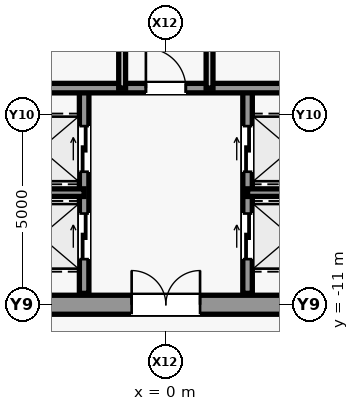
"""IFC4 building model, lengths in metres.
Left out: names, types, materials, properties, quantities, classifications, styles, units other than length and angle.
Written with IfcOpenShell. Run it as: python <this file> out.ifc"""

import sys

from ifc_helpers import new_model, si_unit, direction, frame, frame_2d, origin, place, context, subcontext, project, spatial, rectangle, extrude, source, transform, mapped, element, fill, save


model = new_model("IFC4")
c1 = context("Model", 3, precision=1e-05, world=origin(), true_north=direction((0.0, 1.0)))
c2 = subcontext(c1, "Body", "Model", "MODEL_VIEW")
j1 = project(units=[si_unit("LENGTHUNIT", "METRE"), si_unit("PLANEANGLEUNIT", "RADIAN")], contexts=[c1])
p1 = place(None, origin())
s1 = spatial("IfcSite", under=j1, at=p1, CompositionType="ELEMENT")
p2 = place(p1, origin())
s2 = spatial("IfcBuilding", under=s1, at=p2, CompositionType="ELEMENT")
p3 = place(p2, frame((0.0, 0.0, 12.0)))
s3 = spatial("IfcBuildingStorey", under=s2, at=p3, CompositionType="ELEMENT", Elevation=12.0)
m1 = source(origin(), c2, "Body", "SweptSolid", [
    extrude(rectangle(XDim=9.2, YDim=0.5, at=frame_2d((4.6, 0.0))), origin(), (0.0, 0.0, 1.0), 5.08),
])
p4 = place(p3, frame((-4.6, -11.0, 0.0), z_axis=(0.0, 0.0, 1.0), x_axis=(1.0, 0.0, 0.0)))
e1 = element("IfcWall", 1, at=p4, inside=s3, PredefinedType="SHEAR", context=c2, shape_type="MappedRepresentation", body=[
    mapped(m1, transform((0.0, 0.0, 0.0), scale=1.0)),
])
m2 = source(origin(), c2, "Body", "SweptSolid", [
    extrude(rectangle(XDim=1.8, YDim=2.25, at=frame_2d((0.9, 1.125))), frame((0.0, 0.26, 0.0), z_axis=(0.0, -1.0, 0.0), x_axis=(1.0, 0.0, 0.0)), (0.0, 0.0, 1.0), 0.52),
])
p5 = place(p4, frame((3.7, 0.0, 0.0)))
e2 = element("IfcOpeningElement", 2, at=p5, cuts=e1, PredefinedType="OPENING", context=c2, shape_type="MappedRepresentation", body=[
    mapped(m2, transform((0.0, 0.0, 0.0), scale=1.0)),
])
m3 = source(origin(), c2, "Body", "SweptSolid", [
    extrude(rectangle(XDim=5.4, YDim=0.25, at=frame_2d((2.7, 0.0))), origin(), (0.0, 0.0, 1.0), 5.08),
])
p6 = place(p3, frame((-2.15, -10.7, 0.0), z_axis=(0.0, 0.0, 1.0), x_axis=(0.0, 1.0, 0.0)))
e3 = element("IfcWall", 3, at=p6, inside=s3, PredefinedType="SHEAR", context=c2, shape_type="MappedRepresentation", body=[
    mapped(m3, transform((0.0, 0.0, 0.0), scale=1.0)),
])
m4 = source(origin(), c2, "Body", "SweptSolid", [
    extrude(rectangle(XDim=1.2, YDim=2.3, at=frame_2d((0.6, 1.15))), frame((0.0, 0.135, 0.0), z_axis=(0.0, -1.0, 0.0), x_axis=(1.0, 0.0, 0.0)), (0.0, 0.0, 1.0), 0.27),
])
p7 = place(p6, frame((0.9, 0.0, 0.0)))
e4 = element("IfcOpeningElement", 4, at=p7, cuts=e3, PredefinedType="OPENING", context=c2, shape_type="MappedRepresentation", body=[
    mapped(m4, transform((0.0, 0.0, 0.0), scale=1.0)),
])
p8 = place(p6, frame((3.2, 0.0, 0.0)))
e5 = element("IfcOpeningElement", 5, at=p8, cuts=e3, PredefinedType="OPENING", context=c2, shape_type="MappedRepresentation", body=[
    mapped(m4, transform((0.0, 0.0, 0.0), scale=1.0)),
])
p9 = place(p3, frame((2.15, -10.7, 0.0), z_axis=(0.0, 0.0, 1.0), x_axis=(0.0, 1.0, 0.0)))
e6 = element("IfcWall", 6, at=p9, inside=s3, PredefinedType="SHEAR", context=c2, shape_type="MappedRepresentation", body=[
    mapped(m3, transform((0.0, 0.0, 0.0), scale=1.0)),
])
p10 = place(p9, frame((0.9, 0.0, 0.0)))
e7 = element("IfcOpeningElement", 7, at=p10, cuts=e6, PredefinedType="OPENING", context=c2, shape_type="MappedRepresentation", body=[
    mapped(m4, transform((0.0, 0.0, 0.0), scale=1.0)),
])
p11 = place(p9, frame((3.2, 0.0, 0.0)))
e8 = element("IfcOpeningElement", 8, at=p11, cuts=e6, PredefinedType="OPENING", context=c2, shape_type="MappedRepresentation", body=[
    mapped(m4, transform((0.0, 0.0, 0.0), scale=1.0)),
])
m5 = source(origin(), c2, "Body", "SweptSolid", [
    extrude(rectangle(XDim=2.45, YDim=0.2, at=frame_2d((1.225, 0.0))), origin(), (0.0, 0.0, 1.0), 5.08),
])
for number, where, z_axis, x_axis in (
    (9, (-4.6, -8.05, 0.0), (0.0, 0.0, 1.0), (1.0, 0.0, 0.0)),
    (10, (2.15, -8.05, 0.0), (0.0, 0.0, 1.0), (1.0, 0.0, 0.0)),
):
    element("IfcWall", number, at=place(p3, frame(where, z_axis=z_axis, x_axis=x_axis)), inside=s3, PredefinedType="SHEAR", context=c2, shape_type="MappedRepresentation", body=[
        mapped(m5, transform((0.0, 0.0, 0.0), scale=1.0)),
    ])
m6 = source(origin(), c2, "Body", "SweptSolid", [
    extrude(rectangle(XDim=9.2, YDim=0.25, at=frame_2d((4.6, 0.0))), origin(), (0.0, 0.0, 1.0), 5.08),
])
p12 = place(p3, frame((-4.6, -5.3, 0.0), z_axis=(0.0, 0.0, 1.0), x_axis=(1.0, 0.0, 0.0)))
e11 = element("IfcWall", 11, at=p12, inside=s3, PredefinedType="SHEAR", context=c2, shape_type="MappedRepresentation", body=[
    mapped(m6, transform((0.0, 0.0, 0.0), scale=1.0)),
])
m7 = source(origin(), c2, "Body", "SweptSolid", [
    extrude(rectangle(XDim=1.05, YDim=2.2, at=frame_2d((0.525, 1.1))), frame((0.0, 0.135, 0.0), z_axis=(0.0, -1.0, 0.0), x_axis=(1.0, 0.0, 0.0)), (0.0, 0.0, 1.0), 0.27),
])
p13 = place(p12, frame((4.075, 0.0, 0.0)))
e12 = element("IfcOpeningElement", 12, at=p13, cuts=e11, PredefinedType="OPENING", context=c2, shape_type="MappedRepresentation", body=[
    mapped(m7, transform((0.0, 0.0, 0.0), scale=1.0)),
])
m8 = source(origin(), c2, "Body", "SweptSolid", [
    extrude(rectangle(XDim=10.6, YDim=0.18, at=frame_2d((5.3, 0.0))), origin(), (0.0, 0.0, 1.0), 5.08),
])
p14 = place(p3, frame((-1.15, -5.3, 0.0), z_axis=(0.0, 0.0, 1.0), x_axis=(0.0, 1.0, 0.0)))
e13 = element("IfcWall", 13, at=p14, inside=s3, PredefinedType="PARTITIONING", context=c2, shape_type="MappedRepresentation", body=[
    mapped(m8, transform((0.0, 0.0, 0.0), scale=1.0)),
])
m9 = source(origin(), c2, "Body", "SweptSolid", [
    extrude(rectangle(XDim=0.9, YDim=2.15, at=frame_2d((0.45, 1.075))), frame((0.0, 0.1, 0.0), z_axis=(0.0, -1.0, 0.0), x_axis=(1.0, 0.0, 0.0)), (0.0, 0.0, 1.0), 0.2),
])
p15 = place(p14, frame((1.3, 0.0, 0.0)))
e14 = element("IfcOpeningElement", 14, at=p15, cuts=e13, PredefinedType="OPENING", context=c2, shape_type="MappedRepresentation", body=[
    mapped(m9, transform((0.0, 0.0, 0.0), scale=1.0)),
])
p16 = place(p14, frame((4.9, 0.0, 0.0)))
e15 = element("IfcOpeningElement", 15, at=p16, cuts=e13, PredefinedType="OPENING", context=c2, shape_type="MappedRepresentation", body=[
    mapped(m9, transform((0.0, 0.0, 0.0), scale=1.0)),
])
p17 = place(p14, frame((7.8, 0.0, 0.0)))
e16 = element("IfcOpeningElement", 16, at=p17, cuts=e13, PredefinedType="OPENING", context=c2, shape_type="MappedRepresentation", body=[
    mapped(m9, transform((0.0, 0.0, 0.0), scale=1.0)),
])
p18 = place(p14, frame((9.475, 0.0, 0.0)))
e17 = element("IfcOpeningElement", 17, at=p18, cuts=e13, PredefinedType="OPENING", context=c2, shape_type="MappedRepresentation", body=[
    mapped(m9, transform((0.0, 0.0, 0.0), scale=1.0)),
])
p19 = place(p3, frame((1.15, -5.3, 0.0), z_axis=(0.0, 0.0, 1.0), x_axis=(0.0, 1.0, 0.0)))
e18 = element("IfcWall", 18, at=p19, inside=s3, PredefinedType="PARTITIONING", context=c2, shape_type="MappedRepresentation", body=[
    mapped(m8, transform((0.0, 0.0, 0.0), scale=1.0)),
])
p20 = place(p19, frame((4.2, 0.0, 0.0)))
e19 = element("IfcOpeningElement", 19, at=p20, cuts=e18, PredefinedType="OPENING", context=c2, shape_type="MappedRepresentation", body=[
    mapped(m9, transform((0.0, 0.0, 0.0), scale=1.0)),
])
p21 = place(p19, frame((9.475, 0.0, 0.0)))
e20 = element("IfcOpeningElement", 20, at=p21, cuts=e18, PredefinedType="OPENING", context=c2, shape_type="MappedRepresentation", body=[
    mapped(m9, transform((0.0, 0.0, 0.0), scale=1.0)),
])
m10 = source(origin(), c2, "Body", "SweptSolid", [
    extrude(rectangle(XDim=1.05, YDim=2.2, at=frame_2d((0.525, 1.1))), frame((0.0, 0.025, 0.0), z_axis=(0.0, -1.0, 0.0), x_axis=(1.0, 0.0, 0.0)), (0.0, 0.0, 1.0), 0.05),
])
p22 = place(p13, origin())
e21 = element("IfcDoor", 21, at=p22, inside=s3, OperationType="SINGLE_SWING_LEFT", PredefinedType="DOOR", context=c2, shape_type="MappedRepresentation", body=[
    mapped(m10, transform((0.0, 0.0, 0.0), scale=1.0)),
])
fill(e12, e21)
m11 = source(origin(), c2, "Body", "SweptSolid", [
    extrude(rectangle(XDim=1.8, YDim=2.25, at=frame_2d((0.9, 1.125))), frame((0.0, 0.025, 0.0), z_axis=(0.0, -1.0, 0.0), x_axis=(1.0, 0.0, 0.0)), (0.0, 0.0, 1.0), 0.05),
])
p23 = place(p5, origin())
e22 = element("IfcDoor", 22, at=p23, inside=s3, OperationType="SINGLE_SWING_LEFT", PredefinedType="DOOR", context=c2, shape_type="MappedRepresentation", body=[
    mapped(m11, transform((0.0, 0.0, 0.0), scale=1.0)),
])
fill(e2, e22)
m12 = source(origin(), c2, "Body", "SweptSolid", [
    extrude(rectangle(XDim=1.2, YDim=2.3, at=frame_2d((0.6, 1.15))), frame((0.0, 0.025, 0.0), z_axis=(0.0, -1.0, 0.0), x_axis=(1.0, 0.0, 0.0)), (0.0, 0.0, 1.0), 0.05),
])
p24 = place(p7, origin())
e23 = element("IfcDoor", 23, at=p24, inside=s3, OperationType="SLIDING_TO_LEFT", PredefinedType="DOOR", context=c2, shape_type="MappedRepresentation", body=[
    mapped(m12, transform((0.0, 0.0, 0.0), scale=1.0)),
])
fill(e4, e23)
p25 = place(p10, origin())
e24 = element("IfcDoor", 24, at=p25, inside=s3, OperationType="SLIDING_TO_LEFT", PredefinedType="DOOR", context=c2, shape_type="MappedRepresentation", body=[
    mapped(m12, transform((0.0, 0.0, 0.0), scale=1.0)),
])
fill(e7, e24)
p26 = place(p8, origin())
e25 = element("IfcDoor", 25, at=p26, inside=s3, OperationType="SLIDING_TO_LEFT", PredefinedType="DOOR", context=c2, shape_type="MappedRepresentation", body=[
    mapped(m12, transform((0.0, 0.0, 0.0), scale=1.0)),
])
fill(e5, e25)
p27 = place(p11, origin())
e26 = element("IfcDoor", 26, at=p27, inside=s3, OperationType="SLIDING_TO_LEFT", PredefinedType="DOOR", context=c2, shape_type="MappedRepresentation", body=[
    mapped(m12, transform((0.0, 0.0, 0.0), scale=1.0)),
])
fill(e8, e26)
save(model, sys.argv[1])
